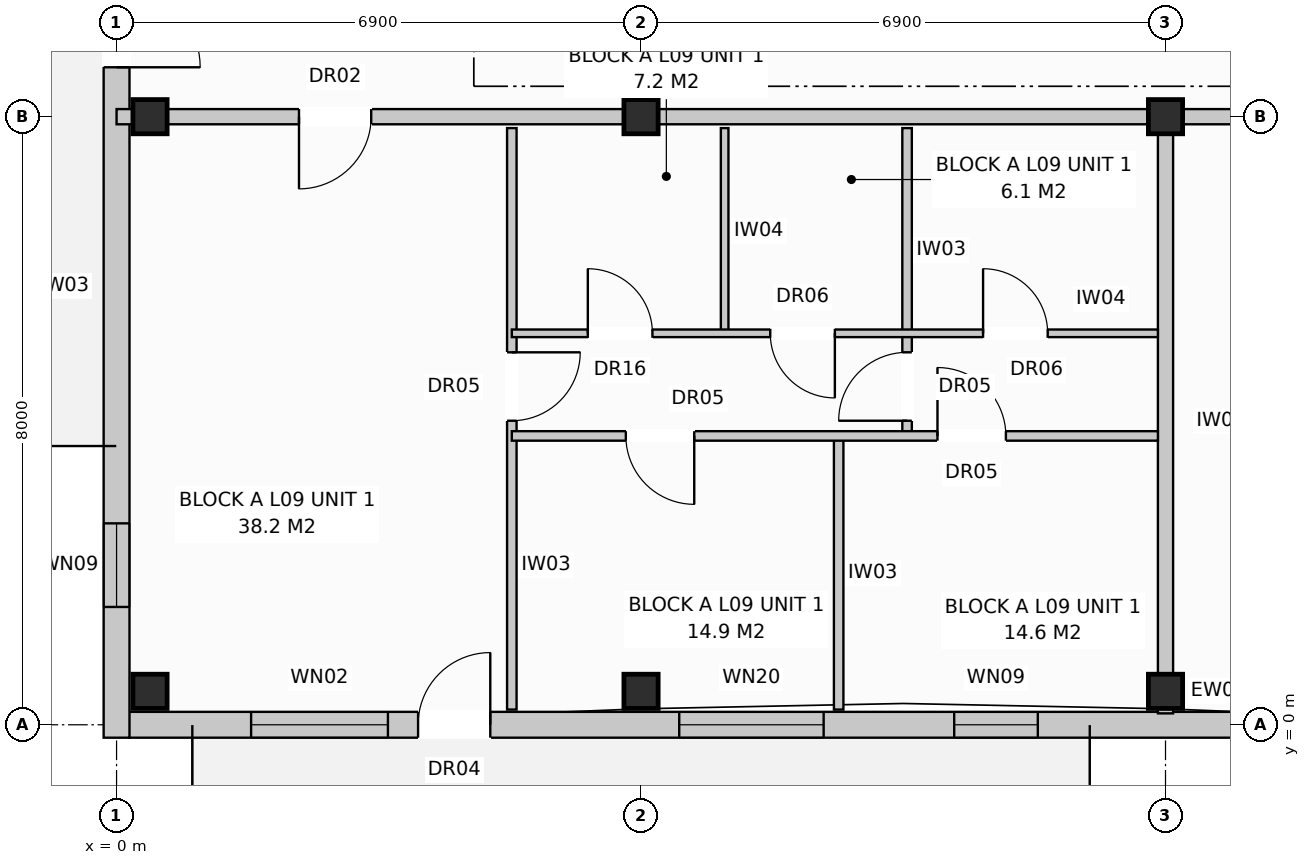
"""IFC4 building model, lengths in metres.
Left out: names, types, materials, properties, quantities, classifications, styles, units other than length and angle.
Written with IfcOpenShell. Run it as: python <this file> out.ifc"""

import sys

from ifc_helpers import new_model, si_unit, direction, frame, frame_2d, origin, origin_with_axes, origin_2d, place, context, subcontext, project, spatial, rectangle, extrude, element, fill, save


model = new_model("IFC4")
c1 = context("Model", 3, precision=1e-05, world=origin(), true_north=direction((0.0, 1.0)))
c2 = subcontext(c1, "Body", "Model", "MODEL_VIEW")
j1 = project(units=[si_unit("LENGTHUNIT", "METRE"), si_unit("PLANEANGLEUNIT", "RADIAN")], contexts=[c1])
p1 = place(None, origin())
s1 = spatial("IfcSite", under=j1, at=p1, CompositionType="ELEMENT")
p2 = place(p1, origin())
s2 = spatial("IfcBuilding", under=s1, at=p2, CompositionType="ELEMENT")
p3 = place(p2, frame((0.0, 0.0, 30.4)))
s3 = spatial("IfcBuildingStorey", under=s2, at=p3, CompositionType="ELEMENT", Elevation=30.4)
for number, where, z_axis, x_axis in (
    (1, (0.44, 0.44, 0.0), (0.0, 0.0, 1.0), (1.0, 0.0, 0.0)),
    (2, (0.44, 8.0, 0.0), (0.0, 0.0, 1.0), (1.0, 0.0, 0.0)),
    (3, (6.9, 0.44, 0.0), (0.0, 0.0, 1.0), (1.0, 0.0, 0.0)),
    (4, (6.9, 8.0, 0.0), (0.0, 0.0, 1.0), (1.0, 0.0, 0.0)),
    (5, (13.8, 0.44, 0.0), (0.0, 0.0, 1.0), (1.0, 0.0, 0.0)),
    (6, (13.8, 8.0, 0.0), (0.0, 0.0, 1.0), (1.0, 0.0, 0.0)),
):
    element("IfcColumn", number, at=place(p3, frame(where, z_axis=z_axis, x_axis=x_axis)), inside=s3, PredefinedType="COLUMN", context=c2, shape_type="SweptSolid", body=[
        extrude(rectangle(XDim=0.45, YDim=0.45, at=origin_2d()), origin(), (0.0, 0.0, 1.0), 3.2),
    ])
p4 = place(p3, frame((0.16, 0.0, 0.0), z_axis=(0.0, 0.0, 1.0), x_axis=(1.0, 0.0, 0.0)))
e7 = element("IfcWall", 7, at=p4, inside=s3, PredefinedType="STANDARD", context=c2, shape_type="SweptSolid", body=[
    extrude(rectangle(XDim=41.08, YDim=0.34, at=frame_2d((20.54, 0.0))), origin(), (0.0, 0.0, 1.0), 2.96),
])
p5 = place(p4, frame((3.807, 0.0, 0.0)))
e8 = element("IfcOpeningElement", 8, at=p5, cuts=e7, PredefinedType="OPENING", context=c2, shape_type="SweptSolid", body=[
    extrude(rectangle(XDim=0.95, YDim=2.1, at=frame_2d((0.475, 1.05))), frame((0.0, 0.182, 0.0), z_axis=(0.0, -1.0, 0.0), x_axis=(1.0, 0.0, 0.0)), (0.0, 0.0, 1.0), 0.364),
])
p6 = place(p4, frame((18.707, 0.0, 0.0)))
e9 = element("IfcOpeningElement", 9, at=p6, cuts=e7, PredefinedType="OPENING", context=c2, shape_type="SweptSolid", body=[
    extrude(rectangle(XDim=0.95, YDim=2.1, at=frame_2d((0.475, 1.05))), frame((0.0, 0.182, 0.0), z_axis=(0.0, -1.0, 0.0), x_axis=(1.0, 0.0, 0.0)), (0.0, 0.0, 1.0), 0.364),
])
p7 = place(p4, frame((29.107, 0.0, 0.0)))
e10 = element("IfcOpeningElement", 10, at=p7, cuts=e7, PredefinedType="OPENING", context=c2, shape_type="SweptSolid", body=[
    extrude(rectangle(XDim=0.95, YDim=2.1, at=frame_2d((0.475, 1.05))), frame((0.0, 0.182, 0.0), z_axis=(0.0, -1.0, 0.0), x_axis=(1.0, 0.0, 0.0)), (0.0, 0.0, 1.0), 0.364),
])
p8 = place(p4, frame((1.61, 0.0, 0.8)))
e11 = element("IfcOpeningElement", 11, at=p8, cuts=e7, PredefinedType="OPENING", context=c2, shape_type="SweptSolid", body=[
    extrude(rectangle(XDim=1.8, YDim=1.7, at=frame_2d((0.9, 0.85))), frame((0.0, 0.182, 0.0), z_axis=(0.0, -1.0, 0.0), x_axis=(1.0, 0.0, 0.0)), (0.0, 0.0, 1.0), 0.364),
])
p9 = place(p4, frame((7.242, 0.0, 0.72)))
e12 = element("IfcOpeningElement", 12, at=p9, cuts=e7, PredefinedType="OPENING", context=c2, shape_type="SweptSolid", body=[
    extrude(rectangle(XDim=1.9, YDim=1.85, at=frame_2d((0.95, 0.925))), frame((0.0, 0.182, 0.0), z_axis=(0.0, -1.0, 0.0), x_axis=(1.0, 0.0, 0.0)), (0.0, 0.0, 1.0), 0.364),
])
p10 = place(p4, frame((10.86, 0.0, 0.72)))
e13 = element("IfcOpeningElement", 13, at=p10, cuts=e7, PredefinedType="OPENING", context=c2, shape_type="SweptSolid", body=[
    extrude(rectangle(XDim=1.1, YDim=1.5, at=frame_2d((0.55, 0.75))), frame((0.0, 0.182, 0.0), z_axis=(0.0, -1.0, 0.0), x_axis=(1.0, 0.0, 0.0)), (0.0, 0.0, 1.0), 0.364),
])
p11 = place(p4, frame((15.91, 0.0, 0.8)))
e14 = element("IfcOpeningElement", 14, at=p11, cuts=e7, PredefinedType="OPENING", context=c2, shape_type="SweptSolid", body=[
    extrude(rectangle(XDim=1.8, YDim=1.7, at=frame_2d((0.9, 0.85))), frame((0.0, 0.182, 0.0), z_axis=(0.0, -1.0, 0.0), x_axis=(1.0, 0.0, 0.0)), (0.0, 0.0, 1.0), 0.364),
])
p12 = place(p4, frame((21.56, 0.0, 0.72)))
e15 = element("IfcOpeningElement", 15, at=p12, cuts=e7, PredefinedType="OPENING", context=c2, shape_type="SweptSolid", body=[
    extrude(rectangle(XDim=1.9, YDim=1.85, at=frame_2d((0.95, 0.925))), frame((0.0, 0.182, 0.0), z_axis=(0.0, -1.0, 0.0), x_axis=(1.0, 0.0, 0.0)), (0.0, 0.0, 1.0), 0.364),
])
p13 = place(p4, frame((25.61, 0.0, 0.72)))
e16 = element("IfcOpeningElement", 16, at=p13, cuts=e7, PredefinedType="OPENING", context=c2, shape_type="SweptSolid", body=[
    extrude(rectangle(XDim=1.1, YDim=1.5, at=frame_2d((0.55, 0.75))), frame((0.0, 0.182, 0.0), z_axis=(0.0, -1.0, 0.0), x_axis=(1.0, 0.0, 0.0)), (0.0, 0.0, 1.0), 0.364),
])
p14 = place(p4, frame((31.41, 0.0, 0.8)))
e17 = element("IfcOpeningElement", 17, at=p14, cuts=e7, PredefinedType="OPENING", context=c2, shape_type="SweptSolid", body=[
    extrude(rectangle(XDim=1.8, YDim=1.7, at=frame_2d((0.9, 0.85))), frame((0.0, 0.182, 0.0), z_axis=(0.0, -1.0, 0.0), x_axis=(1.0, 0.0, 0.0)), (0.0, 0.0, 1.0), 0.364),
])
p15 = place(p4, frame((35.36, 0.0, 0.72)))
e18 = element("IfcOpeningElement", 18, at=p15, cuts=e7, PredefinedType="OPENING", context=c2, shape_type="SweptSolid", body=[
    extrude(rectangle(XDim=1.9, YDim=1.85, at=frame_2d((0.95, 0.925))), frame((0.0, 0.182, 0.0), z_axis=(0.0, -1.0, 0.0), x_axis=(1.0, 0.0, 0.0)), (0.0, 0.0, 1.0), 0.364),
])
p16 = place(p4, frame((39.16, 0.0, 0.72)))
e19 = element("IfcOpeningElement", 19, at=p16, cuts=e7, PredefinedType="OPENING", context=c2, shape_type="SweptSolid", body=[
    extrude(rectangle(XDim=1.1, YDim=1.5, at=frame_2d((0.55, 0.75))), frame((0.0, 0.182, 0.0), z_axis=(0.0, -1.0, 0.0), x_axis=(1.0, 0.0, 0.0)), (0.0, 0.0, 1.0), 0.364),
])
p17 = place(p3, frame((0.0, -0.17, 0.0), z_axis=(0.0, 0.0, 1.0), x_axis=(0.0, 1.0, 0.0)))
e20 = element("IfcWall", 20, at=p17, inside=s3, PredefinedType="STANDARD", context=c2, shape_type="SweptSolid", body=[
    extrude(rectangle(XDim=18.74, YDim=0.34, at=frame_2d((9.37, 0.0))), origin(), (0.0, 0.0, 1.0), 2.96),
])
p18 = place(p17, frame((8.82, 0.0, 0.0)))
e21 = element("IfcOpeningElement", 21, at=p18, cuts=e20, PredefinedType="OPENING", context=c2, shape_type="SweptSolid", body=[
    extrude(rectangle(XDim=1.1, YDim=2.1, at=frame_2d((0.55, 1.05))), frame((0.0, 0.182, 0.0), z_axis=(0.0, -1.0, 0.0), x_axis=(1.0, 0.0, 0.0)), (0.0, 0.0, 1.0), 0.364),
])
p19 = place(p17, frame((1.72, 0.0, 0.72)))
e22 = element("IfcOpeningElement", 22, at=p19, cuts=e20, PredefinedType="OPENING", context=c2, shape_type="SweptSolid", body=[
    extrude(rectangle(XDim=1.1, YDim=1.5, at=frame_2d((0.55, 0.75))), frame((0.0, 0.182, 0.0), z_axis=(0.0, -1.0, 0.0), x_axis=(1.0, 0.0, 0.0)), (0.0, 0.0, 1.0), 0.364),
])
p20 = place(p17, frame((15.92, 0.0, 0.72)))
e23 = element("IfcOpeningElement", 23, at=p20, cuts=e20, PredefinedType="OPENING", context=c2, shape_type="SweptSolid", body=[
    extrude(rectangle(XDim=1.1, YDim=1.5, at=frame_2d((0.55, 0.75))), frame((0.0, 0.182, 0.0), z_axis=(0.0, -1.0, 0.0), x_axis=(1.0, 0.0, 0.0)), (0.0, 0.0, 1.0), 0.364),
])
p21 = place(p3, frame((13.8, 7.85, 0.0), z_axis=(0.0, 0.0, 1.0), x_axis=(0.0, -1.0, 0.0)))
e24 = element("IfcWall", 24, at=p21, inside=s3, PredefinedType="PARTITIONING", context=c2, shape_type="SweptSolid", body=[
    extrude(rectangle(XDim=7.7, YDim=0.2, at=frame_2d((3.85, 0.0))), origin(), (0.0, 0.0, 1.0), 2.96),
])
p22 = place(p3, frame((0.0, 8.0, 0.0), z_axis=(0.0, 0.0, 1.0), x_axis=(1.0, 0.0, 0.0)))
e25 = element("IfcWall", 25, at=p22, inside=s3, PredefinedType="PARTITIONING", context=c2, shape_type="SweptSolid", body=[
    extrude(rectangle(XDim=13.8, YDim=0.2, at=frame_2d((6.9, 0.0))), origin(), (0.0, 0.0, 1.0), 2.4),
])
p23 = place(p22, frame((2.4, 0.0, 0.0)))
e26 = element("IfcOpeningElement", 26, at=p23, cuts=e25, PredefinedType="OPENING", context=c2, shape_type="SweptSolid", body=[
    extrude(rectangle(XDim=0.95, YDim=2.15, at=frame_2d((0.475, 1.075))), frame((0.0, 0.112, 0.0), z_axis=(0.0, -1.0, 0.0), x_axis=(1.0, 0.0, 0.0)), (0.0, 0.0, 1.0), 0.224),
])
p24 = place(p3, frame((5.2, 7.85, 0.0), z_axis=(0.0, 0.0, 1.0), x_axis=(0.0, -1.0, 0.0)))
e27 = element("IfcWall", 27, at=p24, inside=s3, PredefinedType="PARTITIONING", context=c2, shape_type="SweptSolid", body=[
    extrude(rectangle(XDim=7.65, YDim=0.125, at=frame_2d((3.825, 0.0))), origin(), (0.0, 0.0, 1.0), 2.96),
])
p25 = place(p24, frame((2.95, 0.0, 0.0)))
e28 = element("IfcOpeningElement", 28, at=p25, cuts=e27, PredefinedType="OPENING", context=c2, shape_type="SweptSolid", body=[
    extrude(rectangle(XDim=0.9, YDim=2.1, at=frame_2d((0.45, 1.05))), frame((0.0, 0.074, 0.0), z_axis=(0.0, -1.0, 0.0), x_axis=(1.0, 0.0, 0.0)), (0.0, 0.0, 1.0), 0.149),
])
p26 = place(p3, frame((8.0, 7.85, 0.0), z_axis=(0.0, 0.0, 1.0), x_axis=(0.0, -1.0, 0.0)))
e29 = element("IfcWall", 29, at=p26, inside=s3, PredefinedType="PARTITIONING", context=c2, shape_type="SweptSolid", body=[
    extrude(rectangle(XDim=2.7, YDim=0.1, at=frame_2d((1.35, 0.0))), origin(), (0.0, 0.0, 1.0), 2.96),
])
p27 = place(p3, frame((10.4, 7.85, 0.0), z_axis=(0.0, 0.0, 1.0), x_axis=(0.0, -1.0, 0.0)))
e30 = element("IfcWall", 30, at=p27, inside=s3, PredefinedType="PARTITIONING", context=c2, shape_type="SweptSolid", body=[
    extrude(rectangle(XDim=4.05, YDim=0.125, at=frame_2d((2.025, 0.0))), origin(), (0.0, 0.0, 1.0), 2.96),
])
p28 = place(p27, frame((2.95, 0.0, 0.0)))
e31 = element("IfcOpeningElement", 31, at=p28, cuts=e30, PredefinedType="OPENING", context=c2, shape_type="SweptSolid", body=[
    extrude(rectangle(XDim=0.9, YDim=2.1, at=frame_2d((0.45, 1.05))), frame((0.0, 0.074, 0.0), z_axis=(0.0, -1.0, 0.0), x_axis=(1.0, 0.0, 0.0)), (0.0, 0.0, 1.0), 0.149),
])
p29 = place(p3, frame((9.5, 3.8, 0.0), z_axis=(0.0, 0.0, 1.0), x_axis=(0.0, -1.0, 0.0)))
e32 = element("IfcWall", 32, at=p29, inside=s3, PredefinedType="PARTITIONING", context=c2, shape_type="SweptSolid", body=[
    extrude(rectangle(XDim=3.6, YDim=0.125, at=frame_2d((1.8, 0.0))), origin(), (0.0, 0.0, 1.0), 2.96),
])
p30 = place(p3, frame((5.2, 5.15, 0.0), z_axis=(0.0, 0.0, 1.0), x_axis=(1.0, 0.0, 0.0)))
e33 = element("IfcWall", 33, at=p30, inside=s3, PredefinedType="PARTITIONING", context=c2, shape_type="SweptSolid", body=[
    extrude(rectangle(XDim=8.5, YDim=0.1, at=frame_2d((4.25, 0.0))), origin(), (0.0, 0.0, 1.0), 2.96),
])
p31 = place(p30, frame((1.0, 0.0, 0.0)))
e34 = element("IfcOpeningElement", 34, at=p31, cuts=e33, PredefinedType="OPENING", context=c2, shape_type="SweptSolid", body=[
    extrude(rectangle(XDim=0.85, YDim=2.1, at=frame_2d((0.425, 1.05))), frame((0.0, 0.062, 0.0), z_axis=(0.0, -1.0, 0.0), x_axis=(1.0, 0.0, 0.0)), (0.0, 0.0, 1.0), 0.124),
])
p32 = place(p30, frame((3.4, 0.0, 0.0)))
e35 = element("IfcOpeningElement", 35, at=p32, cuts=e33, PredefinedType="OPENING", context=c2, shape_type="SweptSolid", body=[
    extrude(rectangle(XDim=0.85, YDim=2.05, at=frame_2d((0.425, 1.025))), frame((0.0, 0.062, 0.0), z_axis=(0.0, -1.0, 0.0), x_axis=(1.0, 0.0, 0.0)), (0.0, 0.0, 1.0), 0.124),
])
p33 = place(p30, frame((6.2, 0.0, 0.0)))
e36 = element("IfcOpeningElement", 36, at=p33, cuts=e33, PredefinedType="OPENING", context=c2, shape_type="SweptSolid", body=[
    extrude(rectangle(XDim=0.85, YDim=2.05, at=frame_2d((0.425, 1.025))), frame((0.0, 0.062, 0.0), z_axis=(0.0, -1.0, 0.0), x_axis=(1.0, 0.0, 0.0)), (0.0, 0.0, 1.0), 0.124),
])
p34 = place(p3, frame((5.2, 3.8, 0.0), z_axis=(0.0, 0.0, 1.0), x_axis=(1.0, 0.0, 0.0)))
e37 = element("IfcWall", 37, at=p34, inside=s3, PredefinedType="PARTITIONING", context=c2, shape_type="SweptSolid", body=[
    extrude(rectangle(XDim=8.5, YDim=0.125, at=frame_2d((4.25, 0.0))), origin(), (0.0, 0.0, 1.0), 2.96),
])
p35 = place(p34, frame((1.5, 0.0, 0.0)))
e38 = element("IfcOpeningElement", 38, at=p35, cuts=e37, PredefinedType="OPENING", context=c2, shape_type="SweptSolid", body=[
    extrude(rectangle(XDim=0.9, YDim=2.1, at=frame_2d((0.45, 1.05))), frame((0.0, 0.074, 0.0), z_axis=(0.0, -1.0, 0.0), x_axis=(1.0, 0.0, 0.0)), (0.0, 0.0, 1.0), 0.149),
])
p36 = place(p34, frame((5.6, 0.0, 0.0)))
e39 = element("IfcOpeningElement", 39, at=p36, cuts=e37, PredefinedType="OPENING", context=c2, shape_type="SweptSolid", body=[
    extrude(rectangle(XDim=0.9, YDim=2.1, at=frame_2d((0.45, 1.05))), frame((0.0, 0.074, 0.0), z_axis=(0.0, -1.0, 0.0), x_axis=(1.0, 0.0, 0.0)), (0.0, 0.0, 1.0), 0.149),
])
p37 = place(p3, frame((13.8, 8.0, 0.0), z_axis=(0.0, 0.0, 1.0), x_axis=(1.0, 0.0, 0.0)))
e40 = element("IfcWall", 40, at=p37, inside=s3, PredefinedType="PARTITIONING", context=c2, shape_type="SweptSolid", body=[
    extrude(rectangle(XDim=20.7, YDim=0.2, at=frame_2d((10.35, 0.0))), origin(), (0.0, 0.0, 1.0), 2.4),
])
p38 = place(p37, frame((2.4, 0.0, 0.0)))
e41 = element("IfcOpeningElement", 41, at=p38, cuts=e40, PredefinedType="OPENING", context=c2, shape_type="SweptSolid", body=[
    extrude(rectangle(XDim=0.95, YDim=2.15, at=frame_2d((0.475, 1.075))), frame((0.0, 0.112, 0.0), z_axis=(0.0, -1.0, 0.0), x_axis=(1.0, 0.0, 0.0)), (0.0, 0.0, 1.0), 0.224),
])
p39 = place(p5, origin_with_axes())
e42 = element("IfcDoor", 42, at=p39, inside=s3, OperationType="SINGLE_SWING_RIGHT", PredefinedType="DOOR", context=c2, shape_type="SweptSolid", body=[
    extrude(rectangle(XDim=0.95, YDim=2.1, at=frame_2d((0.475, 1.05))), frame((0.0, 0.025, 0.0), z_axis=(0.0, -1.0, 0.0), x_axis=(1.0, 0.0, 0.0)), (0.0, 0.0, 1.0), 0.05),
])
fill(e8, e42)
p40 = place(p8, origin_with_axes())
e43 = element("IfcWindow", 43, at=p40, inside=s3, PartitioningType="SINGLE_PANEL", PredefinedType="WINDOW", context=c2, shape_type="SweptSolid", body=[
    extrude(rectangle(XDim=1.8, YDim=1.7, at=frame_2d((0.9, 0.85))), frame((0.0, 0.03, 0.0), z_axis=(0.0, -1.0, 0.0), x_axis=(1.0, 0.0, 0.0)), (0.0, 0.0, 1.0), 0.06),
])
fill(e11, e43)
p41 = place(p9, origin_with_axes())
e44 = element("IfcWindow", 44, at=p41, inside=s3, PartitioningType="SINGLE_PANEL", PredefinedType="WINDOW", context=c2, shape_type="SweptSolid", body=[
    extrude(rectangle(XDim=1.9, YDim=1.85, at=frame_2d((0.95, 0.925))), frame((0.0, 0.03, 0.0), z_axis=(0.0, -1.0, 0.0), x_axis=(1.0, 0.0, 0.0)), (0.0, 0.0, 1.0), 0.06),
])
fill(e12, e44)
p42 = place(p10, origin_with_axes())
e45 = element("IfcWindow", 45, at=p42, inside=s3, PartitioningType="SINGLE_PANEL", PredefinedType="WINDOW", context=c2, shape_type="SweptSolid", body=[
    extrude(rectangle(XDim=1.1, YDim=1.5, at=frame_2d((0.55, 0.75))), frame((0.0, 0.03, 0.0), z_axis=(0.0, -1.0, 0.0), x_axis=(1.0, 0.0, 0.0)), (0.0, 0.0, 1.0), 0.06),
])
fill(e13, e45)
p43 = place(p18, frame((1.1, 0.0, 0.0), z_axis=(0.0, 0.0, 1.0), x_axis=(-1.0, 0.0, 0.0)))
e46 = element("IfcDoor", 46, at=p43, inside=s3, OperationType="SINGLE_SWING_LEFT", PredefinedType="DOOR", context=c2, shape_type="SweptSolid", body=[
    extrude(rectangle(XDim=1.1, YDim=2.1, at=frame_2d((0.55, 1.05))), frame((0.0, 0.025, 0.0), z_axis=(0.0, -1.0, 0.0), x_axis=(1.0, 0.0, 0.0)), (0.0, 0.0, 1.0), 0.05),
])
fill(e21, e46)
p44 = place(p19, origin_with_axes())
e47 = element("IfcWindow", 47, at=p44, inside=s3, PartitioningType="SINGLE_PANEL", PredefinedType="WINDOW", context=c2, shape_type="SweptSolid", body=[
    extrude(rectangle(XDim=1.1, YDim=1.5, at=frame_2d((0.55, 0.75))), frame((0.0, 0.03, 0.0), z_axis=(0.0, -1.0, 0.0), x_axis=(1.0, 0.0, 0.0)), (0.0, 0.0, 1.0), 0.06),
])
fill(e22, e47)
p45 = place(p23, frame((0.95, 0.0, 0.0), z_axis=(0.0, 0.0, 1.0), x_axis=(-1.0, 0.0, 0.0)))
e48 = element("IfcDoor", 48, at=p45, inside=s3, OperationType="SINGLE_SWING_LEFT", PredefinedType="DOOR", context=c2, shape_type="SweptSolid", body=[
    extrude(rectangle(XDim=0.95, YDim=2.15, at=frame_2d((0.475, 1.075))), frame((0.0, 0.025, 0.0), z_axis=(0.0, -1.0, 0.0), x_axis=(1.0, 0.0, 0.0)), (0.0, 0.0, 1.0), 0.05),
])
fill(e26, e48)
p46 = place(p25, origin_with_axes())
e49 = element("IfcDoor", 49, at=p46, inside=s3, OperationType="SINGLE_SWING_LEFT", PredefinedType="DOOR", context=c2, shape_type="SweptSolid", body=[
    extrude(rectangle(XDim=0.9, YDim=2.1, at=frame_2d((0.45, 1.05))), frame((0.0, 0.025, 0.0), z_axis=(0.0, -1.0, 0.0), x_axis=(1.0, 0.0, 0.0)), (0.0, 0.0, 1.0), 0.05),
])
fill(e28, e49)
p47 = place(p28, frame((0.9, 0.0, 0.0), z_axis=(0.0, 0.0, 1.0), x_axis=(-1.0, 0.0, 0.0)))
e50 = element("IfcDoor", 50, at=p47, inside=s3, OperationType="SINGLE_SWING_RIGHT", PredefinedType="DOOR", context=c2, shape_type="SweptSolid", body=[
    extrude(rectangle(XDim=0.9, YDim=2.1, at=frame_2d((0.45, 1.05))), frame((0.0, 0.025, 0.0), z_axis=(0.0, -1.0, 0.0), x_axis=(1.0, 0.0, 0.0)), (0.0, 0.0, 1.0), 0.05),
])
fill(e31, e50)
p48 = place(p31, origin_with_axes())
e51 = element("IfcDoor", 51, at=p48, inside=s3, OperationType="SINGLE_SWING_LEFT", PredefinedType="DOOR", context=c2, shape_type="SweptSolid", body=[
    extrude(rectangle(XDim=0.85, YDim=2.1, at=frame_2d((0.425, 1.05))), frame((0.0, 0.025, 0.0), z_axis=(0.0, -1.0, 0.0), x_axis=(1.0, 0.0, 0.0)), (0.0, 0.0, 1.0), 0.05),
])
fill(e34, e51)
p49 = place(p32, frame((0.85, 0.0, 0.0), z_axis=(0.0, 0.0, 1.0), x_axis=(-1.0, 0.0, 0.0)))
e52 = element("IfcDoor", 52, at=p49, inside=s3, OperationType="SINGLE_SWING_RIGHT", PredefinedType="DOOR", context=c2, shape_type="SweptSolid", body=[
    extrude(rectangle(XDim=0.85, YDim=2.05, at=frame_2d((0.425, 1.025))), frame((0.0, 0.025, 0.0), z_axis=(0.0, -1.0, 0.0), x_axis=(1.0, 0.0, 0.0)), (0.0, 0.0, 1.0), 0.05),
])
fill(e35, e52)
p50 = place(p33, origin_with_axes())
e53 = element("IfcDoor", 53, at=p50, inside=s3, OperationType="SINGLE_SWING_LEFT", PredefinedType="DOOR", context=c2, shape_type="SweptSolid", body=[
    extrude(rectangle(XDim=0.85, YDim=2.05, at=frame_2d((0.425, 1.025))), frame((0.0, 0.025, 0.0), z_axis=(0.0, -1.0, 0.0), x_axis=(1.0, 0.0, 0.0)), (0.0, 0.0, 1.0), 0.05),
])
fill(e36, e53)
p51 = place(p35, frame((0.9, 0.0, 0.0), z_axis=(0.0, 0.0, 1.0), x_axis=(-1.0, 0.0, 0.0)))
e54 = element("IfcDoor", 54, at=p51, inside=s3, OperationType="SINGLE_SWING_RIGHT", PredefinedType="DOOR", context=c2, shape_type="SweptSolid", body=[
    extrude(rectangle(XDim=0.9, YDim=2.1, at=frame_2d((0.45, 1.05))), frame((0.0, 0.025, 0.0), z_axis=(0.0, -1.0, 0.0), x_axis=(1.0, 0.0, 0.0)), (0.0, 0.0, 1.0), 0.05),
])
fill(e38, e54)
p52 = place(p36, origin_with_axes())
e55 = element("IfcDoor", 55, at=p52, inside=s3, OperationType="SINGLE_SWING_LEFT", PredefinedType="DOOR", context=c2, shape_type="SweptSolid", body=[
    extrude(rectangle(XDim=0.9, YDim=2.1, at=frame_2d((0.45, 1.05))), frame((0.0, 0.025, 0.0), z_axis=(0.0, -1.0, 0.0), x_axis=(1.0, 0.0, 0.0)), (0.0, 0.0, 1.0), 0.05),
])
fill(e39, e55)
save(model, sys.argv[1])
